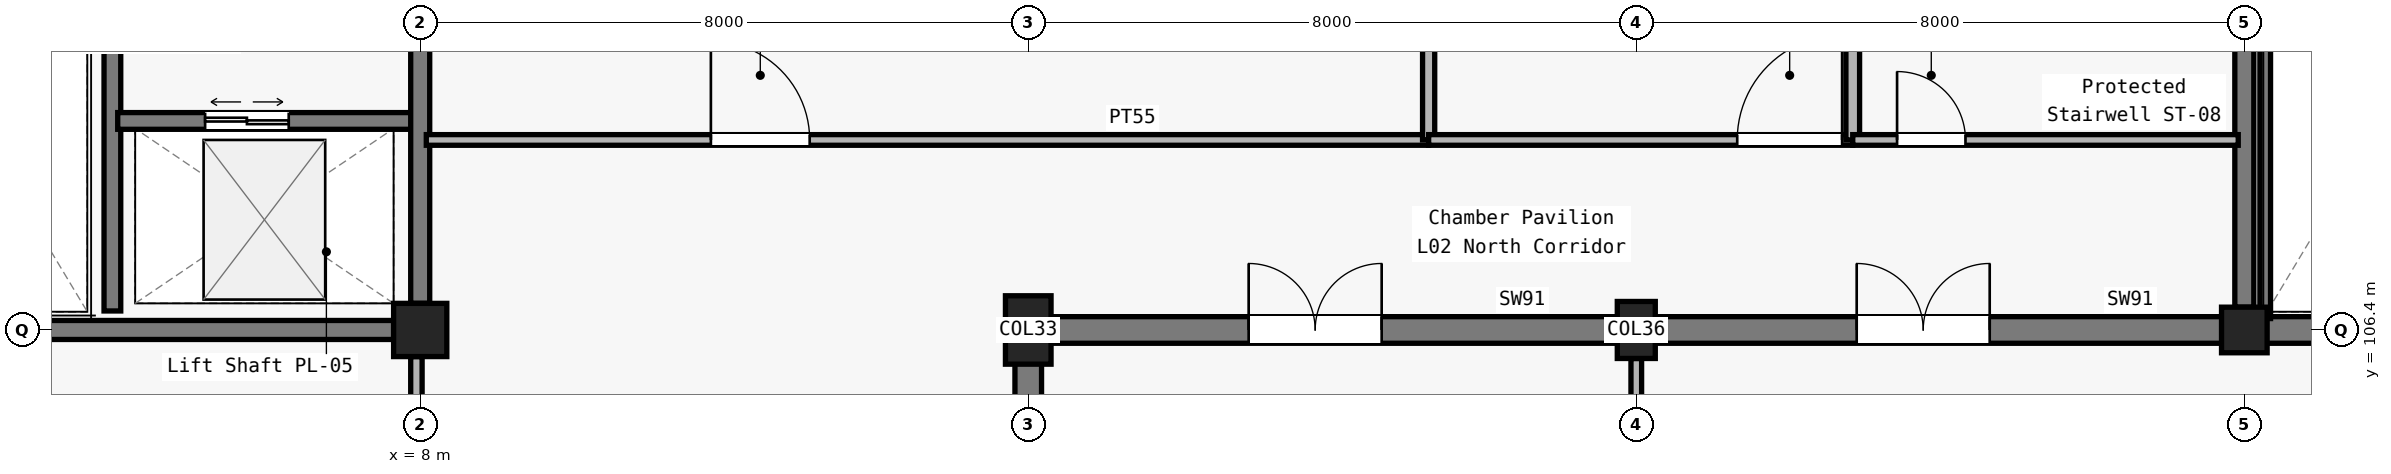
"""IFC4 building model, lengths in metres.
Left out: names, types, materials, properties, quantities, classifications, styles, units other than length and angle.
Written with IfcOpenShell. Run it as: python <this file> out.ifc"""

import sys

from ifc_helpers import new_model, si_unit, direction, frame, frame_2d, origin, origin_2d, place, context, subcontext, project, spatial, rectangle, extrude, element, fill, save


model = new_model("IFC4")
c1 = context("Model", 3, precision=1e-05, world=origin(), true_north=direction((0.0, 1.0)))
c2 = subcontext(c1, "Body", "Model", "MODEL_VIEW")
j1 = project(units=[si_unit("LENGTHUNIT", "METRE"), si_unit("PLANEANGLEUNIT", "RADIAN")], contexts=[c1])
p1 = place(None, origin())
s1 = spatial("IfcSite", under=j1, at=p1, CompositionType="ELEMENT")
p2 = place(p1, origin())
s2 = spatial("IfcBuilding", under=s1, at=p2, CompositionType="ELEMENT")
p3 = place(p2, frame((0.0, 0.0, 10.2)))
s3 = spatial("IfcBuildingStorey", under=s2, at=p3, CompositionType="ELEMENT", Elevation=10.2)
p4 = place(p3, frame((8.0, 106.4, 0.0), z_axis=(0.0, 0.0, 1.0), x_axis=(1.0, 0.0, 0.0)))
e1 = element("IfcColumn", 1, at=p4, inside=s3, PredefinedType="COLUMN", context=c2, shape_type="SweptSolid", body=[
    extrude(rectangle(XDim=0.7, YDim=0.7, at=origin_2d()), origin(), (0.0, 0.0, 1.0), 4.8),
])
p5 = place(p3, frame((16.0, 106.4, 0.0), z_axis=(0.0, 0.0, 1.0), x_axis=(1.0, 0.0, 0.0)))
e2 = element("IfcColumn", 2, at=p5, inside=s3, PredefinedType="COLUMN", context=c2, shape_type="SweptSolid", body=[
    extrude(rectangle(XDim=0.6, YDim=0.9, at=origin_2d()), origin(), (0.0, 0.0, 1.0), 4.8),
])
p6 = place(p3, frame((24.0, 106.4, 0.0), z_axis=(0.0, 0.0, 1.0), x_axis=(1.0, 0.0, 0.0)))
e3 = element("IfcColumn", 3, at=p6, inside=s3, PredefinedType="COLUMN", context=c2, shape_type="SweptSolid", body=[
    extrude(rectangle(XDim=0.5, YDim=0.75, at=origin_2d()), origin(), (0.0, 0.0, 1.0), 4.8),
])
p7 = place(p3, frame((32.0, 106.4, 0.0), z_axis=(0.0, 0.0, 1.0), x_axis=(1.0, 0.0, 0.0)))
e4 = element("IfcColumn", 4, at=p7, inside=s3, PredefinedType="COLUMN", context=c2, shape_type="SweptSolid", body=[
    extrude(rectangle(XDim=0.6, YDim=0.6, at=origin_2d()), origin(), (0.0, 0.0, 1.0), 4.8),
])
p8 = place(p3, frame((16.0, 106.4, 0.0), z_axis=(0.0, 0.0, 1.0), x_axis=(1.0, 0.0, 0.0)))
e5 = element("IfcWall", 5, at=p8, inside=s3, PredefinedType="SHEAR", context=c2, shape_type="SweptSolid", body=[
    extrude(rectangle(XDim=8.0, YDim=0.35, at=frame_2d((4.0, 0.0))), origin(), (0.0, 0.0, 1.0), 4.52),
])
p9 = place(p8, frame((2.9, 0.0, 0.0)))
e6 = element("IfcOpeningElement", 6, at=p9, cuts=e5, PredefinedType="OPENING", context=c2, shape_type="SweptSolid", body=[
    extrude(rectangle(XDim=1.75, YDim=2.25, at=frame_2d((0.875, 1.125))), frame((0.0, 0.185, 0.0), z_axis=(0.0, -1.0, 0.0), x_axis=(1.0, 0.0, 0.0)), (0.0, 0.0, 1.0), 0.37),
])
p10 = place(p3, frame((24.0, 106.4, 0.0), z_axis=(0.0, 0.0, 1.0), x_axis=(1.0, 0.0, 0.0)))
e7 = element("IfcWall", 7, at=p10, inside=s3, PredefinedType="SHEAR", context=c2, shape_type="SweptSolid", body=[
    extrude(rectangle(XDim=8.0, YDim=0.35, at=frame_2d((4.0, 0.0))), origin(), (0.0, 0.0, 1.0), 4.52),
])
p11 = place(p10, frame((2.9, 0.0, 0.0)))
e8 = element("IfcOpeningElement", 8, at=p11, cuts=e7, PredefinedType="OPENING", context=c2, shape_type="SweptSolid", body=[
    extrude(rectangle(XDim=1.75, YDim=2.25, at=frame_2d((0.875, 1.125))), frame((0.0, 0.185, 0.0), z_axis=(0.0, -1.0, 0.0), x_axis=(1.0, 0.0, 0.0)), (0.0, 0.0, 1.0), 0.37),
])
p12 = place(p3, frame((32.0, 106.4, 0.0), z_axis=(0.0, 0.0, 1.0), x_axis=(1.0, 0.0, 0.0)))
e9 = element("IfcWall", 9, at=p12, inside=s3, PredefinedType="SHEAR", context=c2, shape_type="SweptSolid", body=[
    extrude(rectangle(XDim=8.0, YDim=0.35, at=frame_2d((4.0, 0.0))), origin(), (0.0, 0.0, 1.0), 4.52),
])
p13 = place(p3, frame((16.0, 98.8, 0.0), z_axis=(0.0, 0.0, 1.0), x_axis=(0.0, 1.0, 0.0)))
e10 = element("IfcWall", 10, at=p13, inside=s3, PredefinedType="SHEAR", context=c2, shape_type="SweptSolid", body=[
    extrude(rectangle(XDim=7.6, YDim=0.35, at=frame_2d((3.8, 0.0))), origin(), (0.0, 0.0, 1.0), 4.52),
])
p14 = place(p13, frame((2.9, 0.0, 0.0)))
e11 = element("IfcOpeningElement", 11, at=p14, cuts=e10, PredefinedType="OPENING", context=c2, shape_type="SweptSolid", body=[
    extrude(rectangle(XDim=1.75, YDim=2.25, at=frame_2d((0.875, 1.125))), frame((0.0, 0.185, 0.0), z_axis=(0.0, -1.0, 0.0), x_axis=(1.0, 0.0, 0.0)), (0.0, 0.0, 1.0), 0.37),
])
p15 = place(p3, frame((0.4, 106.4, 0.0), z_axis=(0.0, 0.0, 1.0), x_axis=(1.0, 0.0, 0.0)))
e12 = element("IfcWall", 12, at=p15, inside=s3, PredefinedType="SOLIDWALL", context=c2, shape_type="SweptSolid", body=[
    extrude(rectangle(XDim=7.25, YDim=0.25, at=frame_2d((3.625, 0.0))), origin(), (0.0, 0.0, 1.0), 3.865),
])
p16 = place(p3, frame((3.95, 106.65, 0.0), z_axis=(0.0, 0.0, 1.0), x_axis=(0.0, 1.0, 0.0)))
e13 = element("IfcWall", 13, at=p16, inside=s3, PredefinedType="SOLIDWALL", context=c2, shape_type="SweptSolid", body=[
    extrude(rectangle(XDim=7.1, YDim=0.22, at=frame_2d((3.55, 0.0))), origin(), (0.0, 0.0, 1.0), 4.52),
])
p17 = place(p16, frame((5.55, 0.0, 0.0)))
e14 = element("IfcOpeningElement", 14, at=p17, cuts=e13, PredefinedType="OPENING", context=c2, shape_type="SweptSolid", body=[
    extrude(rectangle(XDim=1.2, YDim=2.15, at=frame_2d((0.6, 1.075))), frame((0.0, 0.12, 0.0), z_axis=(0.0, -1.0, 0.0), x_axis=(1.0, 0.0, 0.0)), (0.0, 0.0, 1.0), 0.24),
])
p18 = place(p3, frame((4.02, 109.15, 0.0), z_axis=(0.0, 0.0, 1.0), x_axis=(1.0, 0.0, 0.0)))
e15 = element("IfcWall", 15, at=p18, inside=s3, PredefinedType="SOLIDWALL", context=c2, shape_type="SweptSolid", body=[
    extrude(rectangle(XDim=3.93, YDim=0.22, at=frame_2d((1.965, 0.0))), origin(), (0.0, 0.0, 1.0), 3.865),
])
p19 = place(p18, frame((1.15, 0.0, 0.0)))
e16 = element("IfcOpeningElement", 16, at=p19, cuts=e15, PredefinedType="OPENING", context=c2, shape_type="SweptSolid", body=[
    extrude(rectangle(XDim=1.1, YDim=2.2, at=frame_2d((0.55, 1.1))), frame((0.0, 0.12, 0.0), z_axis=(0.0, -1.0, 0.0), x_axis=(1.0, 0.0, 0.0)), (0.0, 0.0, 1.0), 0.24),
])
p20 = place(p3, frame((8.0, 106.75, 0.0), z_axis=(0.0, 0.0, 1.0), x_axis=(0.0, 1.0, 0.0)))
e17 = element("IfcWall", 17, at=p20, inside=s3, PredefinedType="SOLIDWALL", context=c2, shape_type="SweptSolid", body=[
    extrude(rectangle(XDim=6.8, YDim=0.25, at=frame_2d((3.4, 0.0))), origin(), (0.0, 0.0, 1.0), 3.865),
])
p21 = place(p20, frame((3.5, 0.0, 0.0)))
e18 = element("IfcOpeningElement", 18, at=p21, cuts=e17, PredefinedType="OPENING", context=c2, shape_type="SweptSolid", body=[
    extrude(rectangle(XDim=1.35, YDim=2.2, at=frame_2d((0.675, 1.1))), frame((0.0, 0.135, 0.0), z_axis=(0.0, -1.0, 0.0), x_axis=(1.0, 0.0, 0.0)), (0.0, 0.0, 1.0), 0.27),
])
p22 = place(p3, frame((32.0, 106.7, 0.0), z_axis=(0.0, 0.0, 1.0), x_axis=(0.0, 1.0, 0.0)))
e19 = element("IfcWall", 19, at=p22, inside=s3, PredefinedType="SOLIDWALL", context=c2, shape_type="SweptSolid", body=[
    extrude(rectangle(XDim=7.05, YDim=0.25, at=frame_2d((3.525, 0.0))), origin(), (0.0, 0.0, 1.0), 3.865),
])
p23 = place(p3, frame((8.08, 108.9, 0.0), z_axis=(0.0, 0.0, 1.0), x_axis=(1.0, 0.0, 0.0)))
e20 = element("IfcWall", 20, at=p23, inside=s3, PredefinedType="PARTITIONING", context=c2, shape_type="SweptSolid", body=[
    extrude(rectangle(XDim=13.188, YDim=0.14, at=frame_2d((6.594, 0.0))), origin(), (0.0, 0.0, 1.0), 3.865),
])
p24 = place(p23, frame((3.744, 0.0, 0.0)))
e21 = element("IfcOpeningElement", 21, at=p24, cuts=e20, PredefinedType="OPENING", context=c2, shape_type="SweptSolid", body=[
    extrude(rectangle(XDim=1.3, YDim=2.2, at=frame_2d((0.65, 1.1))), frame((0.0, 0.08, 0.0), z_axis=(0.0, -1.0, 0.0), x_axis=(1.0, 0.0, 0.0)), (0.0, 0.0, 1.0), 0.16),
])
p25 = place(p3, frame((21.268, 108.9, 0.0), z_axis=(0.0, 0.0, 1.0), x_axis=(0.0, 1.0, 0.0)))
e22 = element("IfcWall", 22, at=p25, inside=s3, PredefinedType="PARTITIONING", context=c2, shape_type="SweptSolid", body=[
    extrude(rectangle(XDim=5.02, YDim=0.16, at=frame_2d((2.51, 0.0))), origin(), (0.0, 0.0, 1.0), 3.865),
])
p26 = place(p3, frame((21.268, 108.9, 0.0), z_axis=(0.0, 0.0, 1.0), x_axis=(1.0, 0.0, 0.0)))
e23 = element("IfcWall", 23, at=p26, inside=s3, PredefinedType="PARTITIONING", context=c2, shape_type="SweptSolid", body=[
    extrude(rectangle(XDim=5.58, YDim=0.14, at=frame_2d((2.79, 0.0))), origin(), (0.0, 0.0, 1.0), 3.865),
])
p27 = place(p26, frame((4.06, 0.0, 0.0)))
e24 = element("IfcOpeningElement", 24, at=p27, cuts=e23, PredefinedType="OPENING", context=c2, shape_type="SweptSolid", body=[
    extrude(rectangle(XDim=1.38, YDim=2.2, at=frame_2d((0.69, 1.1))), frame((0.0, 0.08, 0.0), z_axis=(0.0, -1.0, 0.0), x_axis=(1.0, 0.0, 0.0)), (0.0, 0.0, 1.0), 0.16),
])
p28 = place(p3, frame((26.848, 108.9, 0.0), z_axis=(0.0, 0.0, 1.0), x_axis=(0.0, 1.0, 0.0)))
e25 = element("IfcWall", 25, at=p28, inside=s3, PredefinedType="PARTITIONING", context=c2, shape_type="SweptSolid", body=[
    extrude(rectangle(XDim=5.02, YDim=0.18, at=frame_2d((2.51, 0.0))), origin(), (0.0, 0.0, 1.0), 3.865),
])
p29 = place(p3, frame((26.848, 108.9, 0.0), z_axis=(0.0, 0.0, 1.0), x_axis=(1.0, 0.0, 0.0)))
e26 = element("IfcWall", 26, at=p29, inside=s3, PredefinedType="PARTITIONING", context=c2, shape_type="SweptSolid", body=[
    extrude(rectangle(XDim=5.072, YDim=0.14, at=frame_2d((2.536, 0.0))), origin(), (0.0, 0.0, 1.0), 3.865),
])
p30 = place(p29, frame((0.583, 0.0, 0.0)))
e27 = element("IfcOpeningElement", 27, at=p30, cuts=e26, PredefinedType="OPENING", context=c2, shape_type="SweptSolid", body=[
    extrude(rectangle(XDim=0.9, YDim=2.05, at=frame_2d((0.45, 1.025))), frame((0.0, 0.08, 0.0), z_axis=(0.0, -1.0, 0.0), x_axis=(1.0, 0.0, 0.0)), (0.0, 0.0, 1.0), 0.16),
])
p31 = place(p3, frame((7.95, 76.25, 0.0), z_axis=(0.0, 0.0, 1.0), x_axis=(0.0, 1.0, 0.0)))
e28 = element("IfcWall", 28, at=p31, inside=s3, PredefinedType="PARTITIONING", context=c2, shape_type="SweptSolid", body=[
    extrude(rectangle(XDim=29.8, YDim=0.15, at=frame_2d((14.9, 0.0))), origin(), (0.0, 0.0, 1.0), 2.71),
])
p32 = place(p31, frame((3.55, 0.0, 0.0)))
e29 = element("IfcOpeningElement", 29, at=p32, cuts=e28, PredefinedType="OPENING", context=c2, shape_type="SweptSolid", body=[
    extrude(rectangle(XDim=0.94, YDim=2.05, at=frame_2d((0.47, 1.025))), frame((0.0, 0.085, 0.0), z_axis=(0.0, -1.0, 0.0), x_axis=(1.0, 0.0, 0.0)), (0.0, 0.0, 1.0), 0.17),
])
p33 = place(p31, frame((18.75, 0.0, 0.0)))
e30 = element("IfcOpeningElement", 30, at=p33, cuts=e28, PredefinedType="OPENING", context=c2, shape_type="SweptSolid", body=[
    extrude(rectangle(XDim=0.96, YDim=2.05, at=frame_2d((0.48, 1.025))), frame((0.0, 0.085, 0.0), z_axis=(0.0, -1.0, 0.0), x_axis=(1.0, 0.0, 0.0)), (0.0, 0.0, 1.0), 0.17),
])
p34 = place(p3, frame((24.0, 84.0, 0.0), z_axis=(0.0, 0.0, 1.0), x_axis=(0.0, 1.0, 0.0)))
e31 = element("IfcWall", 31, at=p34, inside=s3, PredefinedType="PARTITIONING", context=c2, shape_type="SweptSolid", body=[
    extrude(rectangle(XDim=22.025, YDim=0.14, at=frame_2d((11.012, 0.0))), origin(), (0.0, 0.0, 1.0), 3.865),
])
p35 = place(p3, frame((32.275, 106.55, 0.0), z_axis=(0.0, 0.0, 1.0), x_axis=(0.0, 1.0, 0.0)))
e32 = element("IfcWall", 32, at=p35, inside=s3, PredefinedType="SOLIDWALL", context=c2, shape_type="SweptSolid", body=[
    extrude(rectangle(XDim=7.3, YDim=0.14, at=frame_2d((3.65, 0.0))), origin(), (0.0, 0.0, 1.0), 4.52),
])
p36 = place(p19, origin())
e33 = element("IfcDoor", 33, at=p36, inside=s3, OperationType="DOUBLE_DOOR_SLIDING", PredefinedType="DOOR", context=c2, shape_type="SweptSolid", body=[
    extrude(rectangle(XDim=1.1, YDim=2.2, at=frame_2d((0.55, 1.1))), frame((0.0, 0.025, 0.0), z_axis=(0.0, -1.0, 0.0), x_axis=(1.0, 0.0, 0.0)), (0.0, 0.0, 1.0), 0.05),
])
fill(e16, e33)
p37 = place(p24, origin())
e34 = element("IfcDoor", 34, at=p37, inside=s3, OperationType="SINGLE_SWING_LEFT", PredefinedType="DOOR", context=c2, shape_type="SweptSolid", body=[
    extrude(rectangle(XDim=1.3, YDim=2.2, at=frame_2d((0.65, 1.1))), frame((0.0, 0.025, 0.0), z_axis=(0.0, -1.0, 0.0), x_axis=(1.0, 0.0, 0.0)), (0.0, 0.0, 1.0), 0.05),
])
fill(e21, e34)
p38 = place(p27, origin())
e35 = element("IfcDoor", 35, at=p38, inside=s3, OperationType="SINGLE_SWING_RIGHT", PredefinedType="DOOR", context=c2, shape_type="SweptSolid", body=[
    extrude(rectangle(XDim=1.38, YDim=2.2, at=frame_2d((0.69, 1.1))), frame((0.0, 0.025, 0.0), z_axis=(0.0, -1.0, 0.0), x_axis=(1.0, 0.0, 0.0)), (0.0, 0.0, 1.0), 0.05),
])
fill(e24, e35)
p39 = place(p30, origin())
e36 = element("IfcDoor", 36, at=p39, inside=s3, OperationType="SINGLE_SWING_LEFT", PredefinedType="DOOR", context=c2, shape_type="SweptSolid", body=[
    extrude(rectangle(XDim=0.9, YDim=2.05, at=frame_2d((0.45, 1.025))), frame((0.0, 0.025, 0.0), z_axis=(0.0, -1.0, 0.0), x_axis=(1.0, 0.0, 0.0)), (0.0, 0.0, 1.0), 0.05),
])
fill(e27, e36)
p40 = place(p9, origin())
e37 = element("IfcDoor", 37, at=p40, inside=s3, OperationType="DOUBLE_DOOR_SINGLE_SWING", PredefinedType="DOOR", context=c2, shape_type="SweptSolid", body=[
    extrude(rectangle(XDim=1.75, YDim=2.25, at=frame_2d((0.875, 1.125))), frame((0.0, 0.025, 0.0), z_axis=(0.0, -1.0, 0.0), x_axis=(1.0, 0.0, 0.0)), (0.0, 0.0, 1.0), 0.05),
])
fill(e6, e37)
p41 = place(p11, origin())
e38 = element("IfcDoor", 38, at=p41, inside=s3, OperationType="DOUBLE_DOOR_SINGLE_SWING", PredefinedType="DOOR", context=c2, shape_type="SweptSolid", body=[
    extrude(rectangle(XDim=1.75, YDim=2.25, at=frame_2d((0.875, 1.125))), frame((0.0, 0.025, 0.0), z_axis=(0.0, -1.0, 0.0), x_axis=(1.0, 0.0, 0.0)), (0.0, 0.0, 1.0), 0.05),
])
fill(e8, e38)
save(model, sys.argv[1])
